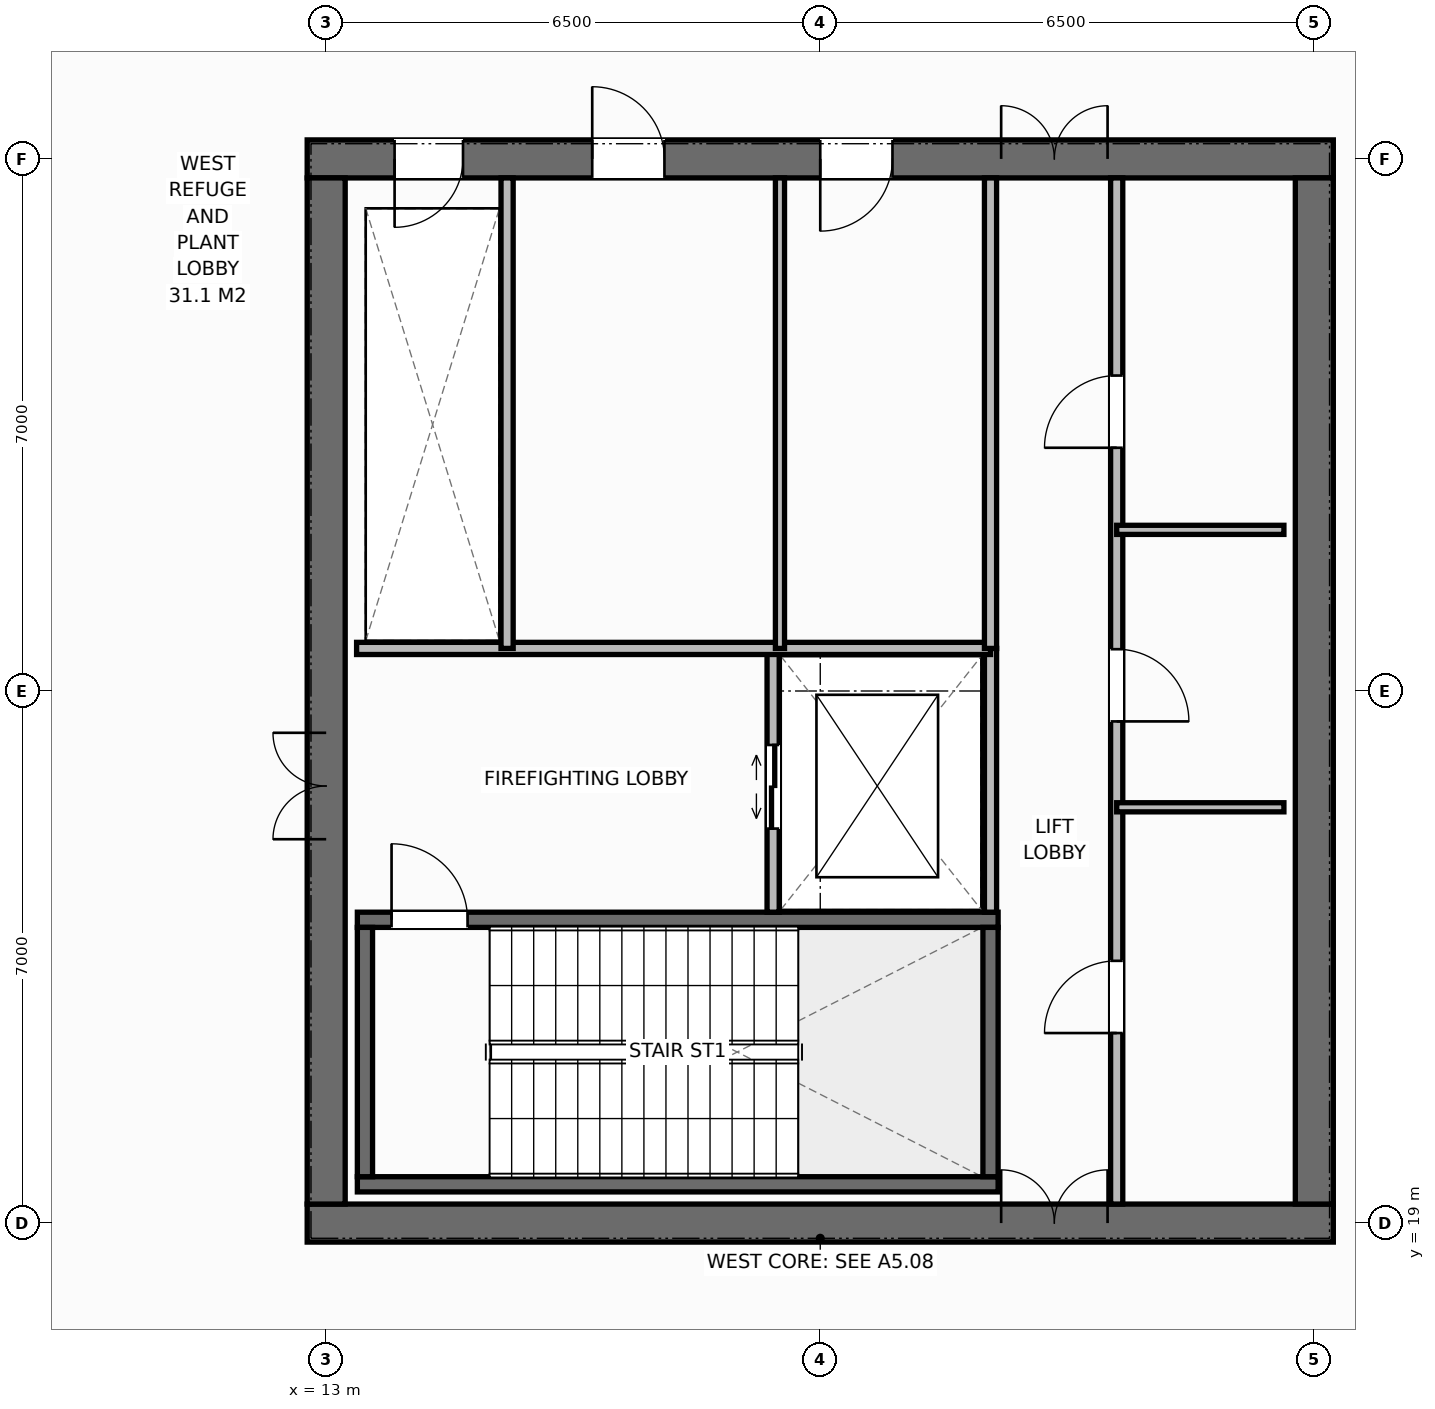
"""IFC4 building model, lengths in metres.
Left out: names, types, materials, properties, quantities, classifications, styles, units other than length and angle.
Written with IfcOpenShell. Run it as: python <this file> out.ifc"""

import sys

from ifc_helpers import new_model, si_unit, direction, frame, frame_2d, origin, place, context, subcontext, project, spatial, rectangle, extrude, element, fill, save


model = new_model("IFC4")
c1 = context("Model", 3, precision=1e-05, world=origin(), true_north=direction((0.0, 1.0)))
c2 = subcontext(c1, "Body", "Model", "MODEL_VIEW")
j1 = project(units=[si_unit("LENGTHUNIT", "METRE"), si_unit("PLANEANGLEUNIT", "RADIAN")], contexts=[c1])
p1 = place(None, origin())
s1 = spatial("IfcSite", under=j1, at=p1, CompositionType="ELEMENT")
p2 = place(p1, origin())
s2 = spatial("IfcBuilding", under=s1, at=p2, CompositionType="ELEMENT")
p3 = place(p2, frame((0.0, 0.0, 315.4)))
s3 = spatial("IfcBuildingStorey", under=s2, at=p3, CompositionType="ELEMENT", Elevation=315.4)
p4 = place(p3, frame((12.75, 19.0, 0.0), z_axis=(0.0, 0.0, 1.0), x_axis=(1.0, 0.0, 0.0)))
e1 = element("IfcWall", 1, at=p4, inside=s3, PredefinedType="SHEAR", context=c2, shape_type="SweptSolid", body=[
    extrude(rectangle(XDim=13.5, YDim=0.5, at=frame_2d((6.75, 0.0))), origin(), (0.0, 0.0, 1.0), 4.58),
])
p5 = place(p4, frame((9.13, 0.0, 0.0)))
e2 = element("IfcOpeningElement", 2, at=p5, cuts=e1, PredefinedType="OPENING", context=c2, shape_type="SweptSolid", body=[
    extrude(rectangle(XDim=1.4, YDim=2.2, at=frame_2d((0.7, 1.1))), frame((0.0, 0.26, 0.0), z_axis=(0.0, -1.0, 0.0), x_axis=(1.0, 0.0, 0.0)), (0.0, 0.0, 1.0), 0.52),
])
p6 = place(p3, frame((12.75, 33.0, 0.0), z_axis=(0.0, 0.0, 1.0), x_axis=(1.0, 0.0, 0.0)))
e3 = element("IfcWall", 3, at=p6, inside=s3, PredefinedType="SHEAR", context=c2, shape_type="SweptSolid", body=[
    extrude(rectangle(XDim=13.5, YDim=0.5, at=frame_2d((6.75, 0.0))), origin(), (0.0, 0.0, 1.0), 4.58),
])
p7 = place(p6, frame((1.15, 0.0, 0.0)))
e4 = element("IfcOpeningElement", 4, at=p7, cuts=e3, PredefinedType="OPENING", context=c2, shape_type="SweptSolid", body=[
    extrude(rectangle(XDim=0.9, YDim=2.15, at=frame_2d((0.45, 1.075))), frame((0.0, 0.26, 0.0), z_axis=(0.0, -1.0, 0.0), x_axis=(1.0, 0.0, 0.0)), (0.0, 0.0, 1.0), 0.52),
])
p8 = place(p6, frame((3.75, 0.0, 0.0)))
e5 = element("IfcOpeningElement", 5, at=p8, cuts=e3, PredefinedType="OPENING", context=c2, shape_type="SweptSolid", body=[
    extrude(rectangle(XDim=0.95, YDim=2.15, at=frame_2d((0.475, 1.075))), frame((0.0, 0.26, 0.0), z_axis=(0.0, -1.0, 0.0), x_axis=(1.0, 0.0, 0.0)), (0.0, 0.0, 1.0), 0.52),
])
p9 = place(p6, frame((6.75, 0.0, 0.0)))
e6 = element("IfcOpeningElement", 6, at=p9, cuts=e3, PredefinedType="OPENING", context=c2, shape_type="SweptSolid", body=[
    extrude(rectangle(XDim=0.95, YDim=2.15, at=frame_2d((0.475, 1.075))), frame((0.0, 0.26, 0.0), z_axis=(0.0, -1.0, 0.0), x_axis=(1.0, 0.0, 0.0)), (0.0, 0.0, 1.0), 0.52),
])
p10 = place(p6, frame((9.13, 0.0, 0.0)))
e7 = element("IfcOpeningElement", 7, at=p10, cuts=e3, PredefinedType="OPENING", context=c2, shape_type="SweptSolid", body=[
    extrude(rectangle(XDim=1.4, YDim=2.2, at=frame_2d((0.7, 1.1))), frame((0.0, 0.26, 0.0), z_axis=(0.0, -1.0, 0.0), x_axis=(1.0, 0.0, 0.0)), (0.0, 0.0, 1.0), 0.52),
])
p11 = place(p3, frame((13.0, 19.25, 0.0), z_axis=(0.0, 0.0, 1.0), x_axis=(0.0, 1.0, 0.0)))
e8 = element("IfcWall", 8, at=p11, inside=s3, PredefinedType="SHEAR", context=c2, shape_type="SweptSolid", body=[
    extrude(rectangle(XDim=13.5, YDim=0.5, at=frame_2d((6.75, 0.0))), origin(), (0.0, 0.0, 1.0), 4.58),
])
p12 = place(p11, frame((4.8, 0.0, 0.0)))
e9 = element("IfcOpeningElement", 9, at=p12, cuts=e8, PredefinedType="OPENING", context=c2, shape_type="SweptSolid", body=[
    extrude(rectangle(XDim=1.4, YDim=2.2, at=frame_2d((0.7, 1.1))), frame((0.0, 0.26, 0.0), z_axis=(0.0, -1.0, 0.0), x_axis=(1.0, 0.0, 0.0)), (0.0, 0.0, 1.0), 0.52),
])
p13 = place(p3, frame((26.0, 19.25, 0.0), z_axis=(0.0, 0.0, 1.0), x_axis=(0.0, 1.0, 0.0)))
e10 = element("IfcWall", 10, at=p13, inside=s3, PredefinedType="SHEAR", context=c2, shape_type="SweptSolid", body=[
    extrude(rectangle(XDim=13.5, YDim=0.5, at=frame_2d((6.75, 0.0))), origin(), (0.0, 0.0, 1.0), 4.58),
])
p14 = place(p3, frame((13.41, 19.51, 0.0), z_axis=(0.0, 0.0, 1.0), x_axis=(1.0, 0.0, 0.0)))
e11 = element("IfcWall", 11, at=p14, inside=s3, PredefinedType="SHEAR", context=c2, shape_type="SweptSolid", body=[
    extrude(rectangle(XDim=8.43, YDim=0.2, at=frame_2d((4.215, 0.0))), origin(), (0.0, 0.0, 1.0), 4.58),
])
p15 = place(p3, frame((13.41, 22.99, 0.0), z_axis=(0.0, 0.0, 1.0), x_axis=(1.0, 0.0, 0.0)))
e12 = element("IfcWall", 12, at=p15, inside=s3, PredefinedType="SHEAR", context=c2, shape_type="SweptSolid", body=[
    extrude(rectangle(XDim=8.43, YDim=0.2, at=frame_2d((4.215, 0.0))), origin(), (0.0, 0.0, 1.0), 4.58),
])
p16 = place(p15, frame((0.45, 0.0, 0.0)))
e13 = element("IfcOpeningElement", 13, at=p16, cuts=e12, PredefinedType="OPENING", context=c2, shape_type="SweptSolid", body=[
    extrude(rectangle(XDim=1.0, YDim=2.15, at=frame_2d((0.5, 1.075))), frame((0.0, 0.11, 0.0), z_axis=(0.0, -1.0, 0.0), x_axis=(1.0, 0.0, 0.0)), (0.0, 0.0, 1.0), 0.22),
])
for number, where, z_axis, x_axis in (
    (14, (13.51, 19.61, 0.0), (0.0, 0.0, 1.0), (0.0, 1.0, 0.0)),
    (15, (21.74, 19.61, 0.0), (0.0, 0.0, 1.0), (0.0, 1.0, 0.0)),
):
    element("IfcWall", number, at=place(p3, frame(where, z_axis=z_axis, x_axis=x_axis)), inside=s3, PredefinedType="SHEAR", context=c2, shape_type="SweptSolid", body=[
        extrude(rectangle(XDim=3.28, YDim=0.2, at=frame_2d((1.64, 0.0))), origin(), (0.0, 0.0, 1.0), 4.58),
    ])
p17 = place(p3, frame((21.74, 23.09, 0.0), z_axis=(0.0, 0.0, 1.0), x_axis=(0.0, 1.0, 0.0)))
e16 = element("IfcWall", 16, at=p17, inside=s3, PredefinedType="STANDARD", context=c2, shape_type="SweptSolid", body=[
    extrude(rectangle(XDim=3.47, YDim=0.16, at=frame_2d((1.735, 0.0))), origin(), (0.0, 0.0, 1.0), 4.58),
])
p18 = place(p3, frame((18.88, 23.09, 0.0), z_axis=(0.0, 0.0, 1.0), x_axis=(0.0, 1.0, 0.0)))
e17 = element("IfcWall", 17, at=p18, inside=s3, PredefinedType="STANDARD", context=c2, shape_type="SweptSolid", body=[
    extrude(rectangle(XDim=3.47, YDim=0.16, at=frame_2d((1.735, 0.0))), origin(), (0.0, 0.0, 1.0), 4.58),
])
p19 = place(p18, frame((1.1, 0.0, 0.0)))
e18 = element("IfcOpeningElement", 18, at=p19, cuts=e17, PredefinedType="OPENING", context=c2, shape_type="SweptSolid", body=[
    extrude(rectangle(XDim=1.1, YDim=2.2, at=frame_2d((0.55, 1.1))), frame((0.0, 0.09, 0.0), z_axis=(0.0, -1.0, 0.0), x_axis=(1.0, 0.0, 0.0)), (0.0, 0.0, 1.0), 0.18),
])
p20 = place(p3, frame((13.4, 26.56, 0.0), z_axis=(0.0, 0.0, 1.0), x_axis=(1.0, 0.0, 0.0)))
e19 = element("IfcWall", 19, at=p20, inside=s3, PredefinedType="STANDARD", context=c2, shape_type="SweptSolid", body=[
    extrude(rectangle(XDim=8.34, YDim=0.16, at=frame_2d((4.17, 0.0))), origin(), (0.0, 0.0, 1.0), 4.58),
])
p21 = place(p3, frame((15.38, 26.56, 0.0), z_axis=(0.0, 0.0, 1.0), x_axis=(0.0, 1.0, 0.0)))
e20 = element("IfcWall", 20, at=p21, inside=s3, PredefinedType="STANDARD", context=c2, shape_type="SweptSolid", body=[
    extrude(rectangle(XDim=6.19, YDim=0.16, at=frame_2d((3.095, 0.0))), origin(), (0.0, 0.0, 1.0), 4.58),
])
p22 = place(p3, frame((18.97, 26.56, 0.0), z_axis=(0.0, 0.0, 1.0), x_axis=(0.0, 1.0, 0.0)))
e21 = element("IfcWall", 21, at=p22, inside=s3, PredefinedType="PARTITIONING", context=c2, shape_type="SweptSolid", body=[
    extrude(rectangle(XDim=6.19, YDim=0.12, at=frame_2d((3.095, 0.0))), origin(), (0.0, 0.0, 1.0), 4.58),
])
p23 = place(p3, frame((21.74, 26.56, 0.0), z_axis=(0.0, 0.0, 1.0), x_axis=(0.0, 1.0, 0.0)))
e22 = element("IfcWall", 22, at=p23, inside=s3, PredefinedType="STANDARD", context=c2, shape_type="SweptSolid", body=[
    extrude(rectangle(XDim=6.19, YDim=0.16, at=frame_2d((3.095, 0.0))), origin(), (0.0, 0.0, 1.0), 4.58),
])
p24 = place(p3, frame((23.4, 19.25, 0.0), z_axis=(0.0, 0.0, 1.0), x_axis=(0.0, 1.0, 0.0)))
e23 = element("IfcWall", 23, at=p24, inside=s3, PredefinedType="STANDARD", context=c2, shape_type="SweptSolid", body=[
    extrude(rectangle(XDim=13.5, YDim=0.16, at=frame_2d((6.75, 0.0))), origin(), (0.0, 0.0, 1.0), 4.58),
])
p25 = place(p24, frame((2.25, 0.0, 0.0)))
e24 = element("IfcOpeningElement", 24, at=p25, cuts=e23, PredefinedType="OPENING", context=c2, shape_type="SweptSolid", body=[
    extrude(rectangle(XDim=0.95, YDim=2.15, at=frame_2d((0.475, 1.075))), frame((0.0, 0.09, 0.0), z_axis=(0.0, -1.0, 0.0), x_axis=(1.0, 0.0, 0.0)), (0.0, 0.0, 1.0), 0.18),
])
p26 = place(p24, frame((6.35, 0.0, 0.0)))
e25 = element("IfcOpeningElement", 25, at=p26, cuts=e23, PredefinedType="OPENING", context=c2, shape_type="SweptSolid", body=[
    extrude(rectangle(XDim=0.95, YDim=2.15, at=frame_2d((0.475, 1.075))), frame((0.0, 0.09, 0.0), z_axis=(0.0, -1.0, 0.0), x_axis=(1.0, 0.0, 0.0)), (0.0, 0.0, 1.0), 0.18),
])
p27 = place(p24, frame((9.95, 0.0, 0.0)))
e26 = element("IfcOpeningElement", 26, at=p27, cuts=e23, PredefinedType="OPENING", context=c2, shape_type="SweptSolid", body=[
    extrude(rectangle(XDim=0.95, YDim=2.15, at=frame_2d((0.475, 1.075))), frame((0.0, 0.09, 0.0), z_axis=(0.0, -1.0, 0.0), x_axis=(1.0, 0.0, 0.0)), (0.0, 0.0, 1.0), 0.18),
])
for number, where, z_axis, x_axis in (
    (27, (23.4, 24.47, 0.0), (0.0, 0.0, 1.0), (1.0, 0.0, 0.0)),
    (28, (23.4, 28.12, 0.0), (0.0, 0.0, 1.0), (1.0, 0.0, 0.0)),
):
    element("IfcWall", number, at=place(p3, frame(where, z_axis=z_axis, x_axis=x_axis)), inside=s3, PredefinedType="PARTITIONING", context=c2, shape_type="SweptSolid", body=[
        extrude(rectangle(XDim=2.2, YDim=0.12, at=frame_2d((1.1, 0.0))), origin(), (0.0, 0.0, 1.0), 4.58),
    ])
p28 = place(p16, origin())
e29 = element("IfcDoor", 29, at=p28, inside=s3, OperationType="SINGLE_SWING_LEFT", PredefinedType="DOOR", context=c2, shape_type="SweptSolid", body=[
    extrude(rectangle(XDim=1.0, YDim=2.15, at=frame_2d((0.5, 1.075))), frame((0.0, 0.025, 0.0), z_axis=(0.0, -1.0, 0.0), x_axis=(1.0, 0.0, 0.0)), (0.0, 0.0, 1.0), 0.05),
])
fill(e13, e29)
p29 = place(p12, origin())
e30 = element("IfcDoor", 30, at=p29, inside=s3, OperationType="DOUBLE_DOOR_SINGLE_SWING", PredefinedType="DOOR", context=c2, shape_type="SweptSolid", body=[
    extrude(rectangle(XDim=1.4, YDim=2.2, at=frame_2d((0.7, 1.1))), frame((0.0, 0.025, 0.0), z_axis=(0.0, -1.0, 0.0), x_axis=(1.0, 0.0, 0.0)), (0.0, 0.0, 1.0), 0.05),
])
fill(e9, e30)
p30 = place(p19, origin())
e31 = element("IfcDoor", 31, at=p30, inside=s3, OperationType="DOUBLE_DOOR_SLIDING", PredefinedType="DOOR", context=c2, shape_type="SweptSolid", body=[
    extrude(rectangle(XDim=1.1, YDim=2.2, at=frame_2d((0.55, 1.1))), frame((0.0, 0.025, 0.0), z_axis=(0.0, -1.0, 0.0), x_axis=(1.0, 0.0, 0.0)), (0.0, 0.0, 1.0), 0.05),
])
fill(e18, e31)
p31 = place(p7, origin())
e32 = element("IfcDoor", 32, at=p31, inside=s3, OperationType="SINGLE_SWING_RIGHT", PredefinedType="DOOR", context=c2, shape_type="SweptSolid", body=[
    extrude(rectangle(XDim=0.9, YDim=2.15, at=frame_2d((0.45, 1.075))), frame((0.0, -0.025, 0.0), z_axis=(0.0, -1.0, 0.0), x_axis=(1.0, 0.0, 0.0)), (0.0, 0.0, 1.0), 0.05),
])
fill(e4, e32)
p32 = place(p8, origin())
e33 = element("IfcDoor", 33, at=p32, inside=s3, OperationType="SINGLE_SWING_LEFT", PredefinedType="DOOR", context=c2, shape_type="SweptSolid", body=[
    extrude(rectangle(XDim=0.95, YDim=2.15, at=frame_2d((0.475, 1.075))), frame((0.0, -0.025, 0.0), z_axis=(0.0, -1.0, 0.0), x_axis=(1.0, 0.0, 0.0)), (0.0, 0.0, 1.0), 0.05),
])
fill(e5, e33)
p33 = place(p9, origin())
e34 = element("IfcDoor", 34, at=p33, inside=s3, OperationType="SINGLE_SWING_RIGHT", PredefinedType="DOOR", context=c2, shape_type="SweptSolid", body=[
    extrude(rectangle(XDim=0.95, YDim=2.15, at=frame_2d((0.475, 1.075))), frame((0.0, -0.025, 0.0), z_axis=(0.0, -1.0, 0.0), x_axis=(1.0, 0.0, 0.0)), (0.0, 0.0, 1.0), 0.05),
])
fill(e6, e34)
p34 = place(p5, origin())
e35 = element("IfcDoor", 35, at=p34, inside=s3, OperationType="DOUBLE_DOOR_SINGLE_SWING", PredefinedType="DOOR", context=c2, shape_type="SweptSolid", body=[
    extrude(rectangle(XDim=1.4, YDim=2.2, at=frame_2d((0.7, 1.1))), frame((0.0, 0.075, 0.0), z_axis=(0.0, -1.0, 0.0), x_axis=(1.0, 0.0, 0.0)), (0.0, 0.0, 1.0), 0.05),
])
fill(e2, e35)
p35 = place(p10, origin())
e36 = element("IfcDoor", 36, at=p35, inside=s3, OperationType="DOUBLE_DOOR_SINGLE_SWING", PredefinedType="DOOR", context=c2, shape_type="SweptSolid", body=[
    extrude(rectangle(XDim=1.4, YDim=2.2, at=frame_2d((0.7, 1.1))), frame((0.0, -0.025, 0.0), z_axis=(0.0, -1.0, 0.0), x_axis=(1.0, 0.0, 0.0)), (0.0, 0.0, 1.0), 0.05),
])
fill(e7, e36)
p36 = place(p25, origin())
e37 = element("IfcDoor", 37, at=p36, inside=s3, OperationType="SINGLE_SWING_LEFT", PredefinedType="DOOR", context=c2, shape_type="SweptSolid", body=[
    extrude(rectangle(XDim=0.95, YDim=2.15, at=frame_2d((0.475, 1.075))), frame((0.0, 0.025, 0.0), z_axis=(0.0, -1.0, 0.0), x_axis=(1.0, 0.0, 0.0)), (0.0, 0.0, 1.0), 0.05),
])
fill(e24, e37)
p37 = place(p26, origin())
e38 = element("IfcDoor", 38, at=p37, inside=s3, OperationType="SINGLE_SWING_RIGHT", PredefinedType="DOOR", context=c2, shape_type="SweptSolid", body=[
    extrude(rectangle(XDim=0.95, YDim=2.15, at=frame_2d((0.475, 1.075))), frame((0.0, 0.025, 0.0), z_axis=(0.0, -1.0, 0.0), x_axis=(1.0, 0.0, 0.0)), (0.0, 0.0, 1.0), 0.05),
])
fill(e25, e38)
p38 = place(p27, origin())
e39 = element("IfcDoor", 39, at=p38, inside=s3, OperationType="SINGLE_SWING_LEFT", PredefinedType="DOOR", context=c2, shape_type="SweptSolid", body=[
    extrude(rectangle(XDim=0.95, YDim=2.15, at=frame_2d((0.475, 1.075))), frame((0.0, 0.025, 0.0), z_axis=(0.0, -1.0, 0.0), x_axis=(1.0, 0.0, 0.0)), (0.0, 0.0, 1.0), 0.05),
])
fill(e26, e39)
save(model, sys.argv[1])
